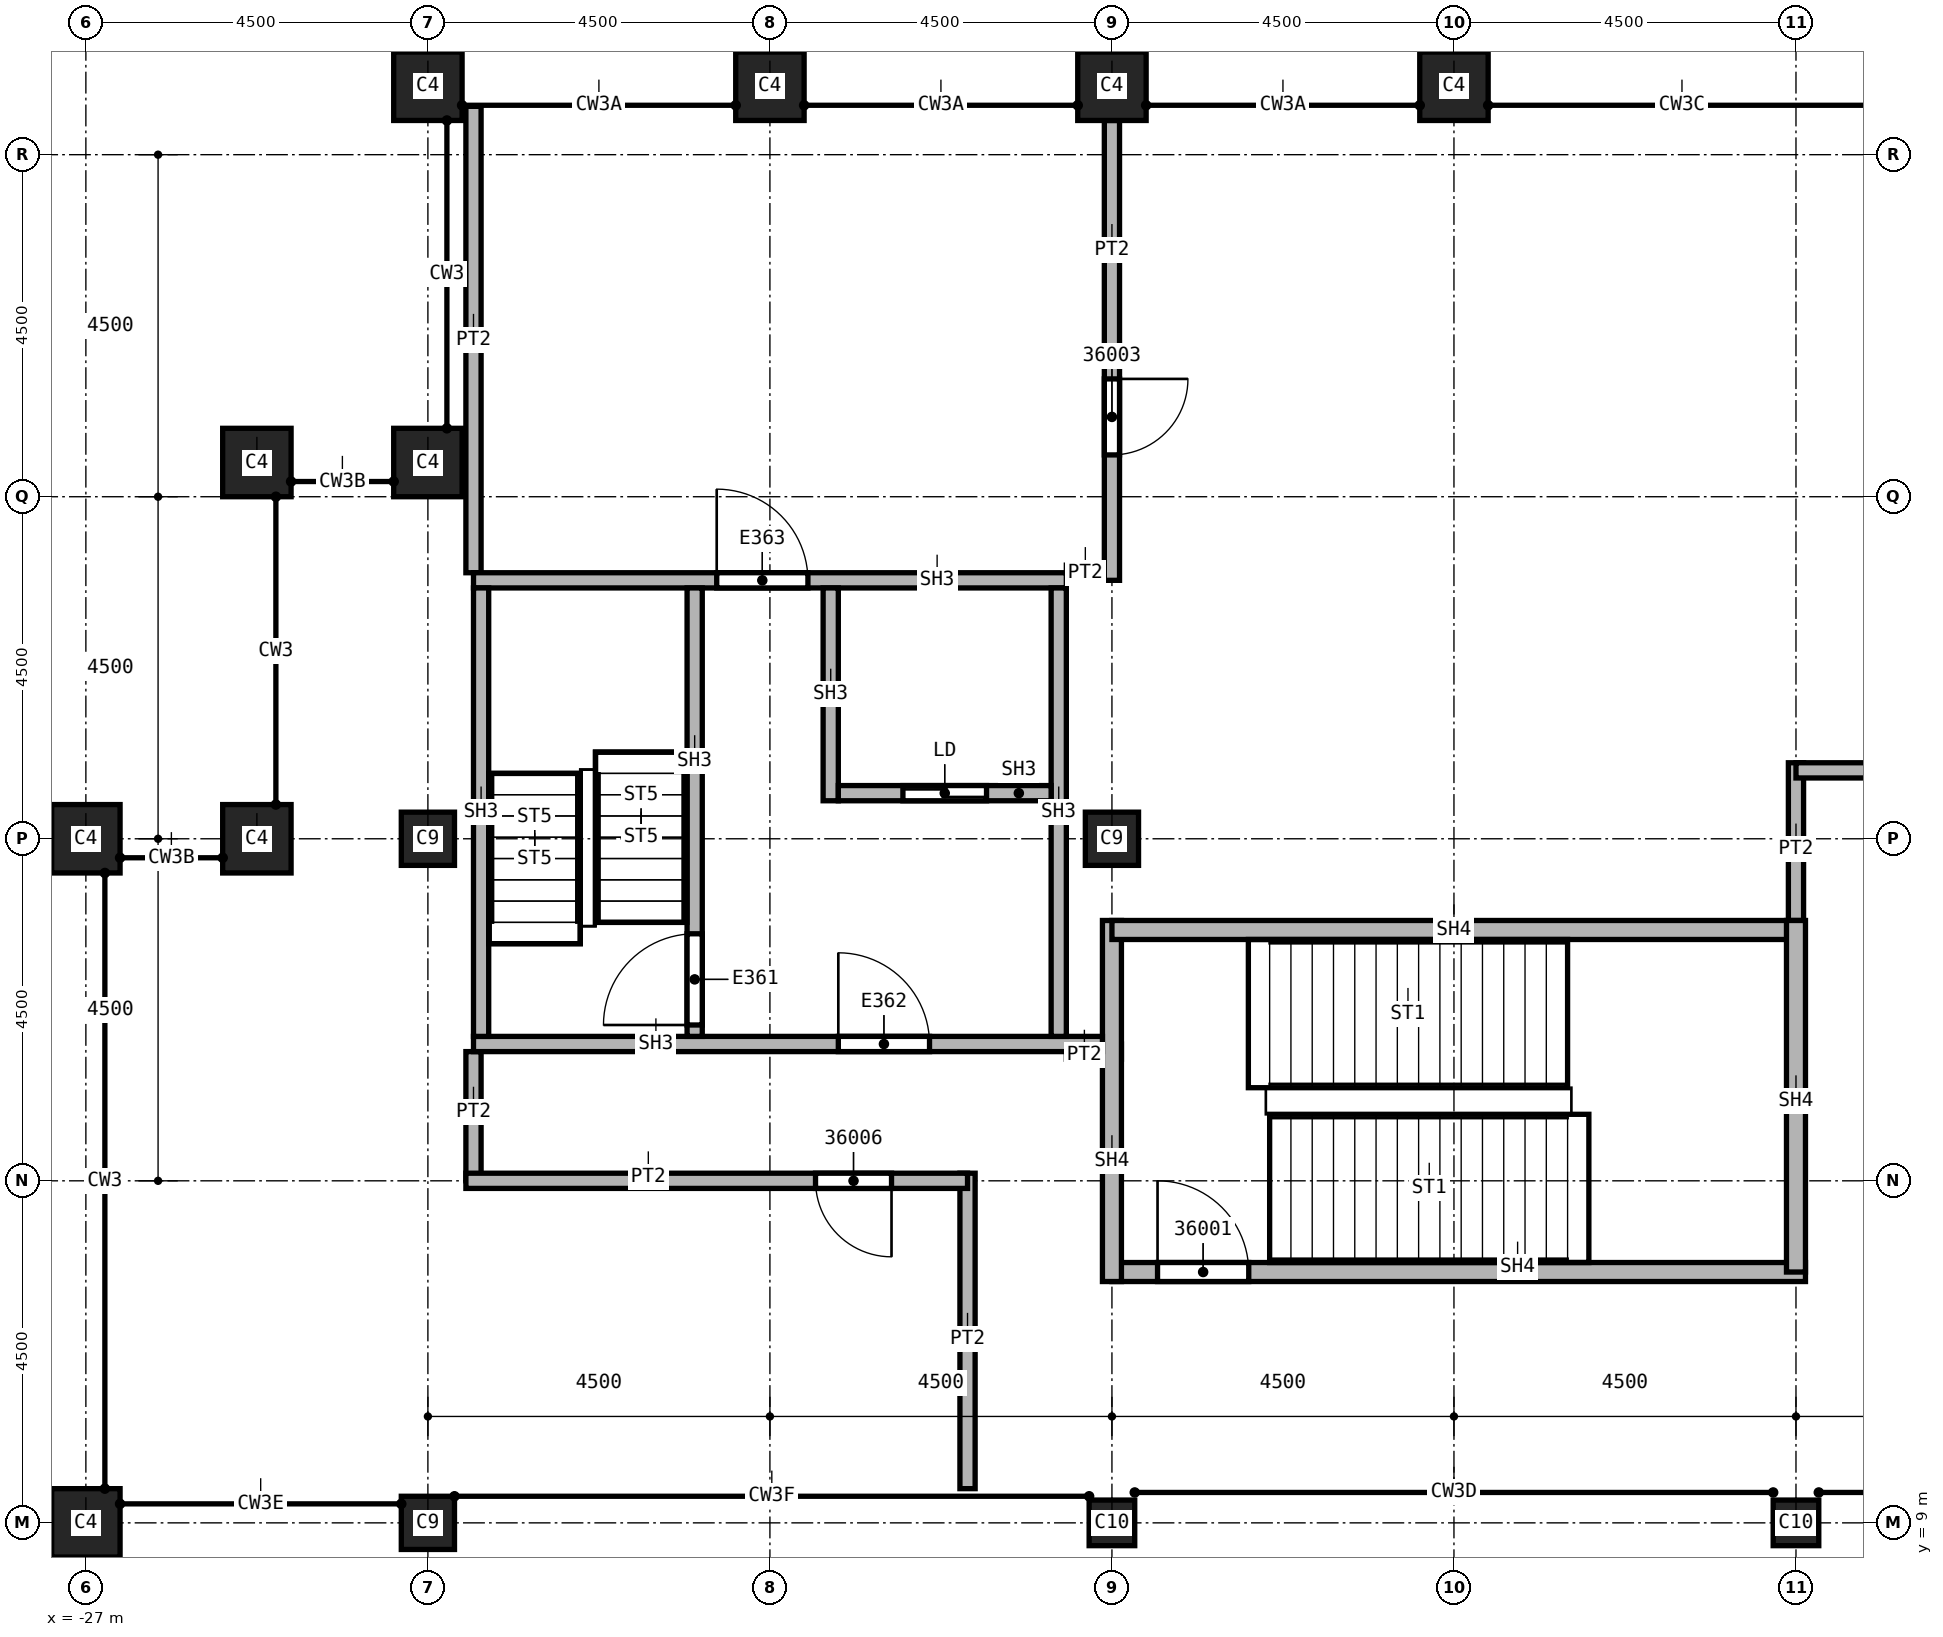
"""IFC4 building model, lengths in metres.
Left out: names, types, materials, properties, quantities, classifications, styles, units other than length and angle.
Written with IfcOpenShell. Run it as: python <this file> out.ifc"""

import sys

from ifc_helpers import new_model, si_unit, direction, frame, frame_2d, origin, origin_2d, place, context, subcontext, project, spatial, rectangle, extrude, element, fill, save


model = new_model("IFC4")
c1 = context("Model", 3, precision=1e-05, world=origin(), true_north=direction((0.0, 1.0)))
c2 = subcontext(c1, "Body", "Model", "MODEL_VIEW")
j1 = project(units=[si_unit("LENGTHUNIT", "METRE"), si_unit("PLANEANGLEUNIT", "RADIAN")], contexts=[c1])
p1 = place(None, origin())
s1 = spatial("IfcSite", under=j1, at=p1, CompositionType="ELEMENT")
p2 = place(p1, origin())
s2 = spatial("IfcBuilding", under=s1, at=p2, CompositionType="ELEMENT")
p3 = place(p2, frame((0.0, 0.0, 381.0)))
s3 = spatial("IfcBuildingStorey", under=s2, at=p3, CompositionType="ELEMENT", Elevation=381.0)
for number, where, z_axis, x_axis in (
    (1, (-13.5, 18.0, 0.0), (0.0, 0.0, 1.0), (1.0, 0.0, 0.0)),
    (2, (-22.5, 9.0, 0.0), (0.0, 0.0, 1.0), (1.0, 0.0, 0.0)),
    (3, (-22.5, 18.0, 0.0), (0.0, 0.0, 1.0), (1.0, 0.0, 0.0)),
):
    element("IfcColumn", number, at=place(p3, frame(where, z_axis=z_axis, x_axis=x_axis)), inside=s3, PredefinedType="COLUMN", context=c2, shape_type="SweptSolid", body=[
        extrude(rectangle(XDim=0.7, YDim=0.7, at=origin_2d()), origin(), (0.0, 0.0, 1.0), 4.6),
    ])
for number, where, z_axis, x_axis in (
    (4, (-4.5, 9.0, 0.0), (0.0, 0.0, 1.0), (1.0, 0.0, 0.0)),
    (5, (-13.5, 9.0, 0.0), (0.0, 0.0, 1.0), (1.0, 0.0, 0.0)),
):
    element("IfcColumn", number, at=place(p3, frame(where, z_axis=z_axis, x_axis=x_axis)), inside=s3, PredefinedType="COLUMN", context=c2, shape_type="SweptSolid", body=[
        extrude(rectangle(XDim=0.6, YDim=0.6, at=origin_2d()), origin(), (0.0, 0.0, 1.0), 4.6),
    ])
for number, where, z_axis, x_axis in (
    (6, (-9.0, 27.9, 0.0), (0.0, 0.0, 1.0), (1.0, 0.0, 0.0)),
    (7, (-13.5, 27.9, 0.0), (0.0, 0.0, 1.0), (1.0, 0.0, 0.0)),
    (8, (-18.0, 27.9, 0.0), (0.0, 0.0, 1.0), (1.0, 0.0, 0.0)),
    (9, (-22.5, 27.9, 0.0), (0.0, 0.0, 1.0), (1.0, 0.0, 0.0)),
    (10, (-27.0, 9.0, 0.0), (0.0, 0.0, 1.0), (0.0, 1.0, 0.0)),
    (11, (-27.0, 18.0, 0.0), (0.0, 0.0, 1.0), (0.0, 1.0, 0.0)),
    (12, (-22.5, 22.95, 0.0), (0.0, 0.0, 1.0), (1.0, 0.0, 0.0)),
    (13, (-24.75, 22.95, 0.0), (0.0, 0.0, 1.0), (1.0, 0.0, 0.0)),
    (14, (-24.75, 18.0, 0.0), (0.0, 0.0, 1.0), (1.0, 0.0, 0.0)),
):
    element("IfcColumn", number, at=place(p3, frame(where, z_axis=z_axis, x_axis=x_axis)), inside=s3, PredefinedType="COLUMN", context=c2, shape_type="SweptSolid", body=[
        extrude(rectangle(XDim=0.9, YDim=0.9, at=origin_2d()), origin(), (0.0, 0.0, 1.0), 4.6),
    ])
p4 = place(p3, frame((-21.9, 13.5, 0.0), z_axis=(0.0, 0.0, 1.0), x_axis=(0.0, 1.0, 0.0)))
e15 = element("IfcWall", 15, at=p4, inside=s3, PredefinedType="PARTITIONING", context=c2, shape_type="SweptSolid", body=[
    extrude(rectangle(XDim=1.7, YDim=0.2, at=frame_2d((0.85, 0.0))), origin(), (0.0, 0.0, 1.0), 4.15),
])
p5 = place(p3, frame((-21.9, 21.5, 0.0), z_axis=(0.0, 0.0, 1.0), x_axis=(0.0, 1.0, 0.0)))
e16 = element("IfcWall", 16, at=p5, inside=s3, PredefinedType="PARTITIONING", context=c2, shape_type="SweptSolid", body=[
    extrude(rectangle(XDim=6.136, YDim=0.2, at=frame_2d((3.068, 0.0))), origin(), (0.0, 0.0, 1.0), 4.15),
])
p6 = place(p3, frame((-15.4, 9.45, 0.0), z_axis=(0.0, 0.0, 1.0), x_axis=(0.0, 1.0, 0.0)))
e17 = element("IfcWall", 17, at=p6, inside=s3, PredefinedType="PARTITIONING", context=c2, shape_type="SweptSolid", body=[
    extrude(rectangle(XDim=4.15, YDim=0.2, at=frame_2d((2.075, 0.0))), origin(), (0.0, 0.0, 1.0), 4.15),
])
p7 = place(p3, frame((-15.4, 13.5, 0.0), z_axis=(0.0, 0.0, 1.0), x_axis=(-1.0, 0.0, 0.0)))
e18 = element("IfcWall", 18, at=p7, inside=s3, PredefinedType="PARTITIONING", context=c2, shape_type="SweptSolid", body=[
    extrude(rectangle(XDim=6.6, YDim=0.2, at=frame_2d((3.3, 0.0))), origin(), (0.0, 0.0, 1.0), 4.15),
])
p8 = place(p7, frame((1.0, 0.0, 0.0)))
e19 = element("IfcOpeningElement", 19, at=p8, cuts=e18, PredefinedType="OPENING", context=c2, shape_type="SweptSolid", body=[
    extrude(rectangle(XDim=1.0, YDim=2.1, at=frame_2d((0.5, 1.05))), frame((0.0, 0.1, 0.0), z_axis=(0.0, -1.0, 0.0), x_axis=(1.0, 0.0, 0.0)), (0.0, 0.0, 1.0), 0.2),
])
p9 = place(p3, frame((-14.1, 15.2, 0.0), z_axis=(0.0, 0.0, 1.0), x_axis=(1.0, 0.0, 0.0)))
e20 = element("IfcWall", 20, at=p9, inside=s3, PredefinedType="PARTITIONING", context=c2, shape_type="SweptSolid", body=[
    extrude(rectangle(XDim=0.725, YDim=0.2, at=frame_2d((0.363, 0.0))), origin(), (0.0, 0.0, 1.0), 4.15),
])
p10 = place(p3, frame((-13.5, 21.5, 0.0), z_axis=(0.0, 0.0, 1.0), x_axis=(-1.0, 0.0, 0.0)))
e21 = element("IfcWall", 21, at=p10, inside=s3, PredefinedType="PARTITIONING", context=c2, shape_type="SweptSolid", body=[
    extrude(rectangle(XDim=0.6, YDim=0.2, at=frame_2d((0.3, 0.0))), origin(), (0.0, 0.0, 1.0), 4.15),
])
p11 = place(p3, frame((-13.5, 27.45, 0.0), z_axis=(0.0, 0.0, 1.0), x_axis=(0.0, -1.0, 0.0)))
e22 = element("IfcWall", 22, at=p11, inside=s3, PredefinedType="PARTITIONING", context=c2, shape_type="SweptSolid", body=[
    extrude(rectangle(XDim=6.05, YDim=0.2, at=frame_2d((3.025, 0.0))), origin(), (0.0, 0.0, 1.0), 4.15),
])
p12 = place(p11, frame((3.4, 0.0, 0.0)))
e23 = element("IfcOpeningElement", 23, at=p12, cuts=e22, PredefinedType="OPENING", context=c2, shape_type="SweptSolid", body=[
    extrude(rectangle(XDim=1.0, YDim=2.1, at=frame_2d((0.5, 1.05))), frame((0.0, 0.1, 0.0), z_axis=(0.0, -1.0, 0.0), x_axis=(1.0, 0.0, 0.0)), (0.0, 0.0, 1.0), 0.2),
])
p13 = place(p3, frame((-4.5, 16.8, 0.0), z_axis=(0.0, 0.0, 1.0), x_axis=(0.0, 1.0, 0.0)))
e24 = element("IfcWall", 24, at=p13, inside=s3, PredefinedType="PARTITIONING", context=c2, shape_type="SweptSolid", body=[
    extrude(rectangle(XDim=2.2, YDim=0.2, at=frame_2d((1.1, 0.0))), origin(), (0.0, 0.0, 1.0), 4.15),
])
p14 = place(p3, frame((-4.5, 18.9, 0.0), z_axis=(0.0, 0.0, 1.0), x_axis=(1.0, 0.0, 0.0)))
e25 = element("IfcWall", 25, at=p14, inside=s3, PredefinedType="PARTITIONING", context=c2, shape_type="SweptSolid", body=[
    extrude(rectangle(XDim=9.1, YDim=0.2, at=frame_2d((4.55, 0.0))), origin(), (0.0, 0.0, 1.0), 4.15),
])
p15 = place(p3, frame((-13.5, 12.3, 0.0), z_axis=(0.0, 0.0, 1.0), x_axis=(1.0, 0.0, 0.0)))
e26 = element("IfcWall", 26, at=p15, inside=s3, PredefinedType="SOLIDWALL", context=c2, shape_type="SweptSolid", body=[
    extrude(rectangle(XDim=9.125, YDim=0.25, at=frame_2d((4.562, 0.0))), origin(), (0.0, 0.0, 1.0), 4.15),
])
p16 = place(p15, frame((0.6, 0.0, 0.0)))
e27 = element("IfcOpeningElement", 27, at=p16, cuts=e26, PredefinedType="OPENING", context=c2, shape_type="SweptSolid", body=[
    extrude(rectangle(XDim=1.2, YDim=2.1, at=frame_2d((0.6, 1.05))), frame((0.0, 0.125, 0.0), z_axis=(0.0, -1.0, 0.0), x_axis=(1.0, 0.0, 0.0)), (0.0, 0.0, 1.0), 0.25),
])
p17 = place(p3, frame((-13.5, 12.175, 0.0), z_axis=(0.0, 0.0, 1.0), x_axis=(0.0, 1.0, 0.0)))
e28 = element("IfcWall", 28, at=p17, inside=s3, PredefinedType="SOLIDWALL", context=c2, shape_type="SweptSolid", body=[
    extrude(rectangle(XDim=4.75, YDim=0.25, at=frame_2d((2.375, 0.0))), origin(), (0.0, 0.0, 1.0), 4.15),
])
p18 = place(p3, frame((-13.5, 16.8, 0.0), z_axis=(0.0, 0.0, 1.0), x_axis=(1.0, 0.0, 0.0)))
e29 = element("IfcWall", 29, at=p18, inside=s3, PredefinedType="SOLIDWALL", context=c2, shape_type="SweptSolid", body=[
    extrude(rectangle(XDim=9.1, YDim=0.25, at=frame_2d((4.55, 0.0))), origin(), (0.0, 0.0, 1.0), 4.15),
])
p19 = place(p3, frame((-4.5, 16.925, 0.0), z_axis=(0.0, 0.0, 1.0), x_axis=(0.0, -1.0, 0.0)))
e30 = element("IfcWall", 30, at=p19, inside=s3, PredefinedType="SOLIDWALL", context=c2, shape_type="SweptSolid", body=[
    extrude(rectangle(XDim=4.625, YDim=0.25, at=frame_2d((2.312, 0.0))), origin(), (0.0, 0.0, 1.0), 4.15),
])
p20 = place(p3, frame((-21.9, 15.3, 0.0), z_axis=(0.0, 0.0, 1.0), x_axis=(1.0, 0.0, 0.0)))
e31 = element("IfcWall", 31, at=p20, inside=s3, PredefinedType="SOLIDWALL", context=c2, shape_type="SweptSolid", body=[
    extrude(rectangle(XDim=8.275, YDim=0.2, at=frame_2d((4.137, 0.0))), origin(), (0.0, 0.0, 1.0), 4.15),
])
p21 = place(p20, frame((4.8, 0.0, 0.0)))
e32 = element("IfcOpeningElement", 32, at=p21, cuts=e31, PredefinedType="OPENING", context=c2, shape_type="SweptSolid", body=[
    extrude(rectangle(XDim=1.2, YDim=2.1, at=frame_2d((0.6, 1.05))), frame((0.0, 0.1, 0.0), z_axis=(0.0, -1.0, 0.0), x_axis=(1.0, 0.0, 0.0)), (0.0, 0.0, 1.0), 0.2),
])
p22 = place(p3, frame((-21.9, 21.4, 0.0), z_axis=(0.0, 0.0, 1.0), x_axis=(1.0, 0.0, 0.0)))
e33 = element("IfcWall", 33, at=p22, inside=s3, PredefinedType="SOLIDWALL", context=c2, shape_type="SweptSolid", body=[
    extrude(rectangle(XDim=7.8, YDim=0.2, at=frame_2d((3.9, 0.0))), origin(), (0.0, 0.0, 1.0), 4.15),
])
p23 = place(p22, frame((3.2, 0.0, 0.0)))
e34 = element("IfcOpeningElement", 34, at=p23, cuts=e33, PredefinedType="OPENING", context=c2, shape_type="SweptSolid", body=[
    extrude(rectangle(XDim=1.2, YDim=2.1, at=frame_2d((0.6, 1.05))), frame((0.0, 0.1, 0.0), z_axis=(0.0, -1.0, 0.0), x_axis=(1.0, 0.0, 0.0)), (0.0, 0.0, 1.0), 0.2),
])
for number, where, z_axis, x_axis in (
    (35, (-21.8, 15.4, 0.0), (0.0, 0.0, 1.0), (0.0, 1.0, 0.0)),
    (36, (-14.2, 15.4, 0.0), (0.0, 0.0, 1.0), (0.0, 1.0, 0.0)),
):
    element("IfcWall", number, at=place(p3, frame(where, z_axis=z_axis, x_axis=x_axis)), inside=s3, PredefinedType="SOLIDWALL", context=c2, shape_type="SweptSolid", body=[
        extrude(rectangle(XDim=5.9, YDim=0.2, at=frame_2d((2.95, 0.0))), origin(), (0.0, 0.0, 1.0), 4.15),
    ])
p24 = place(p3, frame((-18.99, 15.4, 0.0), z_axis=(0.0, 0.0, 1.0), x_axis=(0.0, 1.0, 0.0)))
e37 = element("IfcWall", 37, at=p24, inside=s3, PredefinedType="SOLIDWALL", context=c2, shape_type="SweptSolid", body=[
    extrude(rectangle(XDim=5.9, YDim=0.2, at=frame_2d((2.95, 0.0))), origin(), (0.0, 0.0, 1.0), 4.15),
])
p25 = place(p24, frame((0.15, 0.0, 0.0)))
e38 = element("IfcOpeningElement", 38, at=p25, cuts=e37, PredefinedType="OPENING", context=c2, shape_type="SweptSolid", body=[
    extrude(rectangle(XDim=1.2, YDim=2.1, at=frame_2d((0.6, 1.05))), frame((0.0, 0.1, 0.0), z_axis=(0.0, -1.0, 0.0), x_axis=(1.0, 0.0, 0.0)), (0.0, 0.0, 1.0), 0.2),
])
p26 = place(p3, frame((-17.2, 18.5, 0.0), z_axis=(0.0, 0.0, 1.0), x_axis=(0.0, 1.0, 0.0)))
e39 = element("IfcWall", 39, at=p26, inside=s3, PredefinedType="SOLIDWALL", context=c2, shape_type="SweptSolid", body=[
    extrude(rectangle(XDim=2.8, YDim=0.2, at=frame_2d((1.4, 0.0))), origin(), (0.0, 0.0, 1.0), 4.15),
])
p27 = place(p3, frame((-17.1, 18.6, 0.0), z_axis=(0.0, 0.0, 1.0), x_axis=(1.0, 0.0, 0.0)))
e40 = element("IfcWall", 40, at=p27, inside=s3, PredefinedType="SOLIDWALL", context=c2, shape_type="SweptSolid", body=[
    extrude(rectangle(XDim=2.8, YDim=0.2, at=frame_2d((1.4, 0.0))), origin(), (0.0, 0.0, 1.0), 4.15),
])
p28 = place(p27, frame((0.85, 0.0, 0.0)))
e41 = element("IfcOpeningElement", 41, at=p28, cuts=e40, PredefinedType="OPENING", context=c2, shape_type="SweptSolid", body=[
    extrude(rectangle(XDim=1.1, YDim=2.1, at=frame_2d((0.55, 1.05))), frame((0.0, 0.1, 0.0), z_axis=(0.0, -1.0, 0.0), x_axis=(1.0, 0.0, 0.0)), (0.0, 0.0, 1.0), 0.2),
])
p29 = place(p16, origin())
e42 = element("IfcDoor", 42, at=p29, inside=s3, OperationType="SINGLE_SWING_RIGHT", PredefinedType="DOOR", context=c2, shape_type="SweptSolid", body=[
    extrude(rectangle(XDim=1.2, YDim=2.1, at=frame_2d((0.6, 1.05))), frame((0.0, 0.025, 0.0), z_axis=(0.0, -1.0, 0.0), x_axis=(1.0, 0.0, 0.0)), (0.0, 0.0, 1.0), 0.05),
])
fill(e27, e42)
p30 = place(p12, origin())
e43 = element("IfcDoor", 43, at=p30, inside=s3, OperationType="SINGLE_SWING_RIGHT", PredefinedType="DOOR", context=c2, shape_type="SweptSolid", body=[
    extrude(rectangle(XDim=1.0, YDim=2.1, at=frame_2d((0.5, 1.05))), frame((0.0, 0.025, 0.0), z_axis=(0.0, -1.0, 0.0), x_axis=(1.0, 0.0, 0.0)), (0.0, 0.0, 1.0), 0.05),
])
fill(e23, e43)
p31 = place(p8, origin())
e44 = element("IfcDoor", 44, at=p31, inside=s3, OperationType="SINGLE_SWING_LEFT", PredefinedType="DOOR", context=c2, shape_type="SweptSolid", body=[
    extrude(rectangle(XDim=1.0, YDim=2.1, at=frame_2d((0.5, 1.05))), frame((0.0, 0.025, 0.0), z_axis=(0.0, -1.0, 0.0), x_axis=(1.0, 0.0, 0.0)), (0.0, 0.0, 1.0), 0.05),
])
fill(e19, e44)
p32 = place(p25, origin())
e45 = element("IfcDoor", 45, at=p32, inside=s3, OperationType="SINGLE_SWING_LEFT", PredefinedType="DOOR", context=c2, shape_type="SweptSolid", body=[
    extrude(rectangle(XDim=1.2, YDim=2.1, at=frame_2d((0.6, 1.05))), frame((0.0, 0.025, 0.0), z_axis=(0.0, -1.0, 0.0), x_axis=(1.0, 0.0, 0.0)), (0.0, 0.0, 1.0), 0.05),
])
fill(e38, e45)
p33 = place(p28, origin())
e46 = element("IfcDoor", 46, at=p33, inside=s3, OperationType="SLIDING_TO_LEFT", PredefinedType="DOOR", context=c2, shape_type="SweptSolid", body=[
    extrude(rectangle(XDim=1.1, YDim=2.1, at=frame_2d((0.55, 1.05))), frame((0.0, 0.025, 0.0), z_axis=(0.0, -1.0, 0.0), x_axis=(1.0, 0.0, 0.0)), (0.0, 0.0, 1.0), 0.05),
])
fill(e41, e46)
p34 = place(p21, origin())
e47 = element("IfcDoor", 47, at=p34, inside=s3, OperationType="SINGLE_SWING_RIGHT", PredefinedType="DOOR", context=c2, shape_type="SweptSolid", body=[
    extrude(rectangle(XDim=1.2, YDim=2.1, at=frame_2d((0.6, 1.05))), frame((0.0, 0.025, 0.0), z_axis=(0.0, -1.0, 0.0), x_axis=(1.0, 0.0, 0.0)), (0.0, 0.0, 1.0), 0.05),
])
fill(e32, e47)
p35 = place(p23, origin())
e48 = element("IfcDoor", 48, at=p35, inside=s3, OperationType="SINGLE_SWING_LEFT", PredefinedType="DOOR", context=c2, shape_type="SweptSolid", body=[
    extrude(rectangle(XDim=1.2, YDim=2.1, at=frame_2d((0.6, 1.05))), frame((0.0, 0.025, 0.0), z_axis=(0.0, -1.0, 0.0), x_axis=(1.0, 0.0, 0.0)), (0.0, 0.0, 1.0), 0.05),
])
fill(e34, e48)
save(model, sys.argv[1])
